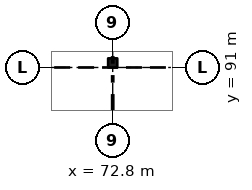
"""IFC4 building model, lengths in metres.
Left out: names, types, materials, properties, quantities, classifications, styles, units other than length and angle.
Written with IfcOpenShell. Run it as: python <this file> out.ifc"""

import sys

from ifc_helpers import new_model, si_unit, direction, frame, origin, origin_2d, place, context, subcontext, project, spatial, rectangle, extrude, element, save


model = new_model("IFC4")
c1 = context("Model", 3, precision=1e-05, world=origin(), true_north=direction((0.0, 1.0)))
c2 = subcontext(c1, "Body", "Model", "MODEL_VIEW")
j1 = project(units=[si_unit("LENGTHUNIT", "METRE"), si_unit("PLANEANGLEUNIT", "RADIAN")], contexts=[c1])
p1 = place(None, origin())
s1 = spatial("IfcSite", under=j1, at=p1, CompositionType="ELEMENT")
p2 = place(p1, origin())
s2 = spatial("IfcBuilding", under=s1, at=p2, CompositionType="ELEMENT")
p3 = place(p2, frame((0.0, 0.0, 6.37)))
s3 = spatial("IfcBuildingStorey", under=s2, at=p3, CompositionType="ELEMENT", Elevation=6.37)
p4 = place(p3, frame((72.8, 91.3, 0.0), z_axis=(0.0, 0.0, 1.0), x_axis=(1.0, 0.0, 0.0)))
e1 = element("IfcColumn", 1, at=p4, inside=s3, PredefinedType="COLUMN", context=c2, shape_type="SweptSolid", body=[
    extrude(rectangle(XDim=0.6, YDim=0.6, at=origin_2d()), origin(), (0.0, 0.0, 1.0), 4.55),
])
save(model, sys.argv[1])
